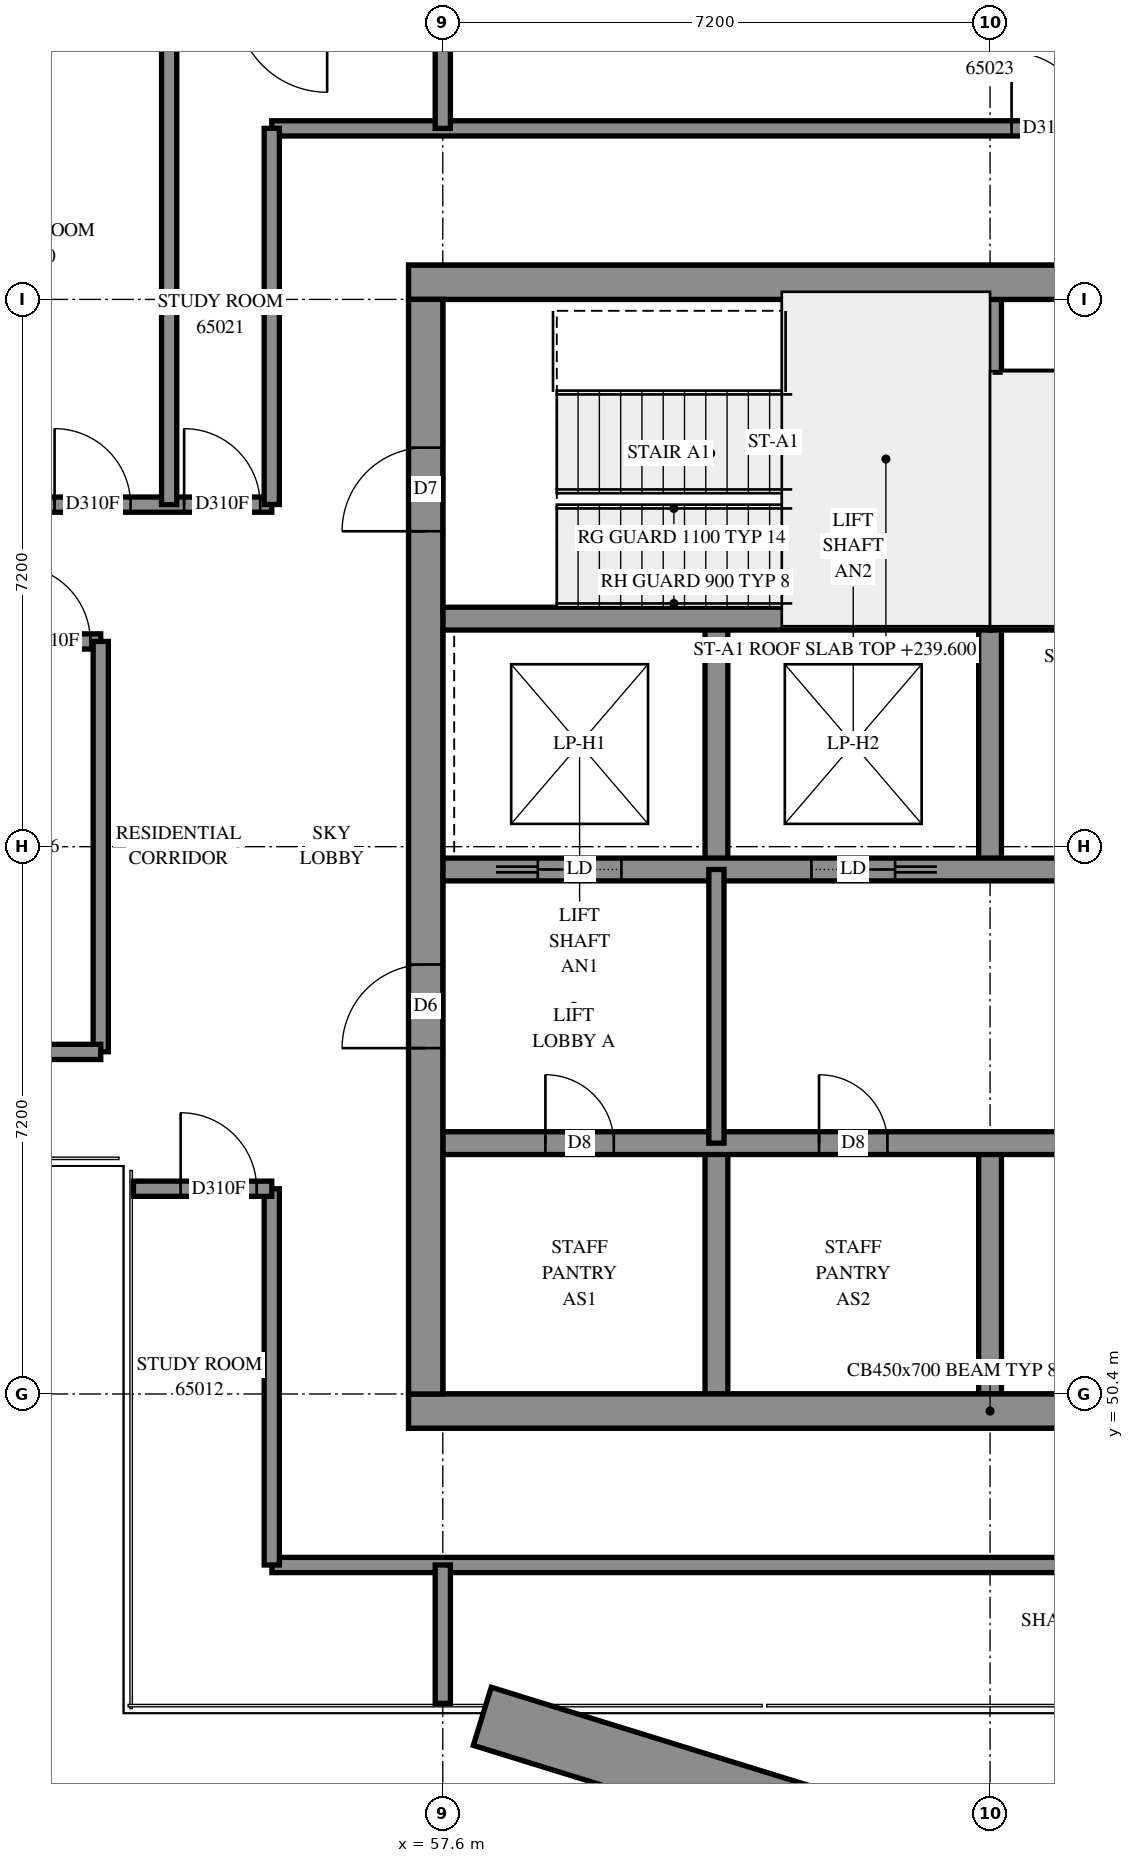
"""IFC4 building model, lengths in metres.
Left out: names, types, materials, properties, quantities, classifications, styles, units other than length and angle.
Written with IfcOpenShell. Run it as: python <this file> out.ifc"""

import sys

from ifc_helpers import new_model, si_unit, direction, frame, frame_2d, origin, place, context, subcontext, project, spatial, rectangle, extrude, element, fill, save


model = new_model("IFC4")
c1 = context("Model", 3, precision=1e-05, world=origin(), true_north=direction((0.0, 1.0)))
c2 = subcontext(c1, "Body", "Model", "MODEL_VIEW")
j1 = project(units=[si_unit("LENGTHUNIT", "METRE"), si_unit("PLANEANGLEUNIT", "RADIAN")], contexts=[c1])
p1 = place(None, origin())
s1 = spatial("IfcSite", under=j1, at=p1, CompositionType="ELEMENT")
p2 = place(p1, origin())
s2 = spatial("IfcBuilding", under=s1, at=p2, CompositionType="ELEMENT")
p3 = place(p2, frame((0.0, 0.0, 239.6)))
s3 = spatial("IfcBuildingStorey", under=s2, at=p3, CompositionType="ELEMENT", Elevation=239.6)
p4 = place(p3, frame((57.15, 50.175, -0.3), z_axis=(0.0, 0.0, 1.0), x_axis=(1.0, 0.0, 0.0)))
e1 = element("IfcWall", 1, at=p4, inside=s3, PredefinedType="SHEAR", context=c2, shape_type="SweptSolid", body=[
    extrude(rectangle(XDim=15.3, YDim=0.45, at=frame_2d((7.65, 0.0))), origin(), (0.0, 0.0, 1.0), 3.5),
])
p5 = place(p3, frame((57.15, 65.025, -0.3), z_axis=(0.0, 0.0, 1.0), x_axis=(1.0, 0.0, 0.0)))
e2 = element("IfcWall", 2, at=p5, inside=s3, PredefinedType="SHEAR", context=c2, shape_type="SweptSolid", body=[
    extrude(rectangle(XDim=15.3, YDim=0.45, at=frame_2d((7.65, 0.0))), origin(), (0.0, 0.0, 1.0), 3.5),
])
p6 = place(p5, frame((10.45, 0.0, 0.3)))
e3 = element("IfcOpeningElement", 3, at=p6, cuts=e2, PredefinedType="OPENING", context=c2, shape_type="SweptSolid", body=[
    extrude(rectangle(XDim=0.8, YDim=2.1, at=frame_2d((0.4, 1.05))), frame((0.0, 0.235, 0.0), z_axis=(0.0, -1.0, 0.0), x_axis=(1.0, 0.0, 0.0)), (0.0, 0.0, 1.0), 0.47),
])
p7 = place(p3, frame((57.375, 50.4, -0.3), z_axis=(0.0, 0.0, 1.0), x_axis=(0.0, 1.0, 0.0)))
e4 = element("IfcWall", 4, at=p7, inside=s3, PredefinedType="SHEAR", context=c2, shape_type="SweptSolid", body=[
    extrude(rectangle(XDim=14.4, YDim=0.45, at=frame_2d((7.2, 0.0))), origin(), (0.0, 0.0, 1.0), 3.5),
])
p8 = place(p7, frame((4.55, 0.0, 0.3)))
e5 = element("IfcOpeningElement", 5, at=p8, cuts=e4, PredefinedType="OPENING", context=c2, shape_type="SweptSolid", body=[
    extrude(rectangle(XDim=1.1, YDim=2.1, at=frame_2d((0.55, 1.05))), frame((0.0, 0.235, 0.0), z_axis=(0.0, -1.0, 0.0), x_axis=(1.0, 0.0, 0.0)), (0.0, 0.0, 1.0), 0.47),
])
p9 = place(p7, frame((11.35, 0.0, 0.3)))
e6 = element("IfcOpeningElement", 6, at=p9, cuts=e4, PredefinedType="OPENING", context=c2, shape_type="SweptSolid", body=[
    extrude(rectangle(XDim=1.1, YDim=2.1, at=frame_2d((0.55, 1.05))), frame((0.0, 0.235, 0.0), z_axis=(0.0, -1.0, 0.0), x_axis=(1.0, 0.0, 0.0)), (0.0, 0.0, 1.0), 0.47),
])
for number, where, z_axis, x_axis in (
    (7, (61.2, 50.4, 0.0), (0.0, 0.0, 1.0), (0.0, 1.0, 0.0)),
    (8, (61.2, 57.3, 0.0), (0.0, 0.0, 1.0), (0.0, 1.0, 0.0)),
    (9, (64.8, 50.4, 0.0), (0.0, 0.0, 1.0), (0.0, 1.0, 0.0)),
    (10, (64.8, 57.3, 0.0), (0.0, 0.0, 1.0), (0.0, 1.0, 0.0)),
):
    element("IfcWall", number, at=place(p3, frame(where, z_axis=z_axis, x_axis=x_axis)), inside=s3, PredefinedType="SOLIDWALL", context=c2, shape_type="SweptSolid", body=[
        extrude(rectangle(XDim=3.3, YDim=0.3, at=frame_2d((1.65, 0.0))), origin(), (0.0, 0.0, 1.0), 3.9),
    ])
p10 = place(p3, frame((57.6, 53.7, 0.0), z_axis=(0.0, 0.0, 1.0), x_axis=(1.0, 0.0, 0.0)))
e11 = element("IfcWall", 11, at=p10, inside=s3, PredefinedType="SOLIDWALL", context=c2, shape_type="SweptSolid", body=[
    extrude(rectangle(XDim=14.4, YDim=0.3, at=frame_2d((7.2, 0.0))), origin(), (0.0, 0.0, 1.0), 3.9),
])
p11 = place(p10, frame((1.35, 0.0, 0.0)))
e12 = element("IfcOpeningElement", 12, at=p11, cuts=e11, PredefinedType="OPENING", context=c2, shape_type="SweptSolid", body=[
    extrude(rectangle(XDim=0.9, YDim=2.1, at=frame_2d((0.45, 1.05))), frame((0.0, 0.16, 0.0), z_axis=(0.0, -1.0, 0.0), x_axis=(1.0, 0.0, 0.0)), (0.0, 0.0, 1.0), 0.32),
])
p12 = place(p10, frame((4.95, 0.0, 0.0)))
e13 = element("IfcOpeningElement", 13, at=p12, cuts=e11, PredefinedType="OPENING", context=c2, shape_type="SweptSolid", body=[
    extrude(rectangle(XDim=0.9, YDim=2.1, at=frame_2d((0.45, 1.05))), frame((0.0, 0.16, 0.0), z_axis=(0.0, -1.0, 0.0), x_axis=(1.0, 0.0, 0.0)), (0.0, 0.0, 1.0), 0.32),
])
p13 = place(p10, frame((8.55, 0.0, 0.0)))
e14 = element("IfcOpeningElement", 14, at=p13, cuts=e11, PredefinedType="OPENING", context=c2, shape_type="SweptSolid", body=[
    extrude(rectangle(XDim=0.9, YDim=2.1, at=frame_2d((0.45, 1.05))), frame((0.0, 0.16, 0.0), z_axis=(0.0, -1.0, 0.0), x_axis=(1.0, 0.0, 0.0)), (0.0, 0.0, 1.0), 0.32),
])
p14 = place(p10, frame((12.05, 0.0, 0.0)))
e15 = element("IfcOpeningElement", 15, at=p14, cuts=e11, PredefinedType="OPENING", context=c2, shape_type="SweptSolid", body=[
    extrude(rectangle(XDim=1.1, YDim=2.1, at=frame_2d((0.55, 1.05))), frame((0.0, 0.16, 0.0), z_axis=(0.0, -1.0, 0.0), x_axis=(1.0, 0.0, 0.0)), (0.0, 0.0, 1.0), 0.32),
])
p15 = place(p3, frame((57.6, 57.3, 0.0), z_axis=(0.0, 0.0, 1.0), x_axis=(1.0, 0.0, 0.0)))
e16 = element("IfcWall", 16, at=p15, inside=s3, PredefinedType="SOLIDWALL", context=c2, shape_type="SweptSolid", body=[
    extrude(rectangle(XDim=14.4, YDim=0.3, at=frame_2d((7.2, 0.0))), origin(), (0.0, 0.0, 1.0), 3.9),
])
p16 = place(p15, frame((1.25, 0.0, 0.0)))
e17 = element("IfcOpeningElement", 17, at=p16, cuts=e16, PredefinedType="OPENING", context=c2, shape_type="SweptSolid", body=[
    extrude(rectangle(XDim=1.1, YDim=2.1, at=frame_2d((0.55, 1.05))), frame((0.0, 0.16, 0.0), z_axis=(0.0, -1.0, 0.0), x_axis=(1.0, 0.0, 0.0)), (0.0, 0.0, 1.0), 0.32),
])
p17 = place(p15, frame((4.85, 0.0, 0.0)))
e18 = element("IfcOpeningElement", 18, at=p17, cuts=e16, PredefinedType="OPENING", context=c2, shape_type="SweptSolid", body=[
    extrude(rectangle(XDim=1.1, YDim=2.1, at=frame_2d((0.55, 1.05))), frame((0.0, 0.16, 0.0), z_axis=(0.0, -1.0, 0.0), x_axis=(1.0, 0.0, 0.0)), (0.0, 0.0, 1.0), 0.32),
])
p18 = place(p15, frame((12.05, 0.0, 0.0)))
e19 = element("IfcOpeningElement", 19, at=p18, cuts=e16, PredefinedType="OPENING", context=c2, shape_type="SweptSolid", body=[
    extrude(rectangle(XDim=1.1, YDim=2.1, at=frame_2d((0.55, 1.05))), frame((0.0, 0.16, 0.0), z_axis=(0.0, -1.0, 0.0), x_axis=(1.0, 0.0, 0.0)), (0.0, 0.0, 1.0), 0.32),
])
for number, where, z_axis, x_axis in (
    (20, (57.6, 60.6, 0.0), (0.0, 0.0, 1.0), (1.0, 0.0, 0.0)),
    (21, (64.8, 60.6, 0.0), (0.0, 0.0, 1.0), (1.0, 0.0, 0.0)),
):
    element("IfcWall", number, at=place(p3, frame(where, z_axis=z_axis, x_axis=x_axis)), inside=s3, PredefinedType="SOLIDWALL", context=c2, shape_type="SweptSolid", body=[
        extrude(rectangle(XDim=7.2, YDim=0.3, at=frame_2d((3.6, 0.0))), origin(), (0.0, 0.0, 1.0), 3.9),
    ])
p19 = place(p3, frame((64.8, 60.6, 0.0), z_axis=(0.0, 0.0, 1.0), x_axis=(0.0, 1.0, 0.0)))
e22 = element("IfcWall", 22, at=p19, inside=s3, PredefinedType="SOLIDWALL", context=c2, shape_type="SweptSolid", body=[
    extrude(rectangle(XDim=4.2, YDim=0.3, at=frame_2d((2.1, 0.0))), origin(), (0.0, 0.0, 1.0), 3.9),
])
p20 = place(p3, frame((62.8, 44.712, 0.0), z_axis=(0.0, 0.0, 1.0), x_axis=(-0.9553591731, 0.2954468656, 0.0)))
e23 = element("IfcWall", 23, at=p20, inside=s3, PredefinedType="SOLIDWALL", context=c2, shape_type="SweptSolid", body=[
    extrude(rectangle(XDim=4.899, YDim=0.8, at=frame_2d((2.449, 0.0))), origin(), (0.0, 0.0, 1.0), 0.65),
])
p21 = place(p3, frame((64.95, 63.78, 0.0), z_axis=(0.0, 0.0, 1.0), x_axis=(1.0, 0.0, 0.0)))
e24 = element("IfcWall", 24, at=p21, inside=s3, PredefinedType="PARTITIONING", context=c2, shape_type="SweptSolid", body=[
    extrude(rectangle(XDim=6.25, YDim=0.15, at=frame_2d((3.125, 0.0))), origin(), (0.0, 0.0, 1.0), 3.9),
])
p22 = place(p3, frame((61.2, 53.7, 0.0), z_axis=(0.0, 0.0, 1.0), x_axis=(0.0, 1.0, 0.0)))
e25 = element("IfcWall", 25, at=p22, inside=s3, PredefinedType="PARTITIONING", context=c2, shape_type="SweptSolid", body=[
    extrude(rectangle(XDim=3.6, YDim=0.2, at=frame_2d((1.8, 0.0))), origin(), (0.0, 0.0, 1.0), 3.9),
])
p23 = place(p3, frame((55.352, 48.15, 0.0), z_axis=(0.0, 0.0, 1.0), x_axis=(1.0, 0.0, 0.0)))
e26 = element("IfcWall", 26, at=p23, inside=s3, PredefinedType="PARTITIONING", context=c2, shape_type="SweptSolid", body=[
    extrude(rectangle(XDim=19.06, YDim=0.2, at=frame_2d((9.53, 0.0))), origin(), (0.0, 0.0, 1.0), 3.9),
])
p24 = place(p23, frame((11.608, 0.0, 0.0)))
e27 = element("IfcOpeningElement", 27, at=p24, cuts=e26, PredefinedType="OPENING", context=c2, shape_type="SweptSolid", body=[
    extrude(rectangle(XDim=1.0, YDim=2.1, at=frame_2d((0.5, 1.05))), frame((0.0, 0.11, 0.0), z_axis=(0.0, -1.0, 0.0), x_axis=(1.0, 0.0, 0.0)), (0.0, 0.0, 1.0), 0.22),
])
p25 = place(p3, frame((55.35, 67.05, 0.0), z_axis=(0.0, 0.0, 1.0), x_axis=(1.0, 0.0, 0.0)))
e28 = element("IfcWall", 28, at=p25, inside=s3, PredefinedType="PARTITIONING", context=c2, shape_type="SweptSolid", body=[
    extrude(rectangle(XDim=18.9, YDim=0.2, at=frame_2d((9.45, 0.0))), origin(), (0.0, 0.0, 1.0), 3.9),
])
p26 = place(p25, frame((9.733, 0.0, 0.0)))
e29 = element("IfcOpeningElement", 29, at=p26, cuts=e28, PredefinedType="OPENING", context=c2, shape_type="SweptSolid", body=[
    extrude(rectangle(XDim=1.0, YDim=2.1, at=frame_2d((0.5, 1.05))), frame((0.0, 0.11, 0.0), z_axis=(0.0, -1.0, 0.0), x_axis=(1.0, 0.0, 0.0)), (0.0, 0.0, 1.0), 0.22),
])
p27 = place(p3, frame((40.502, 62.1, 0.0), z_axis=(0.0, 0.0, 1.0), x_axis=(1.0, 0.0, 0.0)))
e30 = element("IfcWall", 30, at=p27, inside=s3, PredefinedType="PARTITIONING", context=c2, shape_type="SweptSolid", body=[
    extrude(rectangle(XDim=14.848, YDim=0.2, at=frame_2d((7.424, 0.0))), origin(), (0.0, 0.0, 1.0), 3.9),
])
p28 = place(p27, frame((6.561, 0.0, 0.0)))
e31 = element("IfcOpeningElement", 31, at=p28, cuts=e30, PredefinedType="OPENING", context=c2, shape_type="SweptSolid", body=[
    extrude(rectangle(XDim=1.0, YDim=2.1, at=frame_2d((0.5, 1.05))), frame((0.0, 0.11, 0.0), z_axis=(0.0, -1.0, 0.0), x_axis=(1.0, 0.0, 0.0)), (0.0, 0.0, 1.0), 0.22),
])
p29 = place(p27, frame((11.991, 0.0, 0.0)))
e32 = element("IfcOpeningElement", 32, at=p29, cuts=e30, PredefinedType="OPENING", context=c2, shape_type="SweptSolid", body=[
    extrude(rectangle(XDim=1.0, YDim=2.1, at=frame_2d((0.5, 1.05))), frame((0.0, 0.11, 0.0), z_axis=(0.0, -1.0, 0.0), x_axis=(1.0, 0.0, 0.0)), (0.0, 0.0, 1.0), 0.22),
])
p30 = place(p27, frame((13.695, 0.0, 0.0)))
e33 = element("IfcOpeningElement", 33, at=p30, cuts=e30, PredefinedType="OPENING", context=c2, shape_type="SweptSolid", body=[
    extrude(rectangle(XDim=1.0, YDim=2.1, at=frame_2d((0.5, 1.05))), frame((0.0, 0.11, 0.0), z_axis=(0.0, -1.0, 0.0), x_axis=(1.0, 0.0, 0.0)), (0.0, 0.0, 1.0), 0.22),
])
p31 = place(p3, frame((46.33, 60.3, 0.0), z_axis=(0.0, 0.0, 1.0), x_axis=(1.0, 0.0, 0.0)))
e34 = element("IfcWall", 34, at=p31, inside=s3, PredefinedType="PARTITIONING", context=c2, shape_type="SweptSolid", body=[
    extrude(rectangle(XDim=6.77, YDim=0.2, at=frame_2d((3.385, 0.0))), origin(), (0.0, 0.0, 1.0), 3.9),
])
p32 = place(p31, frame((0.924, 0.0, 0.0)))
e35 = element("IfcOpeningElement", 35, at=p32, cuts=e34, PredefinedType="OPENING", context=c2, shape_type="SweptSolid", body=[
    extrude(rectangle(XDim=1.0, YDim=2.1, at=frame_2d((0.5, 1.05))), frame((0.0, 0.11, 0.0), z_axis=(0.0, -1.0, 0.0), x_axis=(1.0, 0.0, 0.0)), (0.0, 0.0, 1.0), 0.22),
])
p33 = place(p31, frame((5.633, 0.0, 0.0)))
e36 = element("IfcOpeningElement", 36, at=p33, cuts=e34, PredefinedType="OPENING", context=c2, shape_type="SweptSolid", body=[
    extrude(rectangle(XDim=1.0, YDim=2.1, at=frame_2d((0.5, 1.05))), frame((0.0, 0.11, 0.0), z_axis=(0.0, -1.0, 0.0), x_axis=(1.0, 0.0, 0.0)), (0.0, 0.0, 1.0), 0.22),
])
p34 = place(p3, frame((54.0, 62.1, 0.0), z_axis=(0.0, 0.0, 1.0), x_axis=(0.0, 1.0, 0.0)))
e37 = element("IfcWall", 37, at=p34, inside=s3, PredefinedType="PARTITIONING", context=c2, shape_type="SweptSolid", body=[
    extrude(rectangle(XDim=6.35, YDim=0.2, at=frame_2d((3.175, 0.0))), origin(), (0.0, 0.0, 1.0), 3.9),
])
p35 = place(p3, frame((53.1, 54.902, 0.0), z_axis=(0.0, 0.0, 1.0), x_axis=(0.0, 1.0, 0.0)))
e38 = element("IfcWall", 38, at=p35, inside=s3, PredefinedType="PARTITIONING", context=c2, shape_type="SweptSolid", body=[
    extrude(rectangle(XDim=5.398, YDim=0.2, at=frame_2d((2.699, 0.0))), origin(), (0.0, 0.0, 1.0), 3.9),
])
p36 = place(p3, frame((55.35, 48.15, 0.0), z_axis=(0.0, 0.0, 1.0), x_axis=(0.0, 1.0, 0.0)))
e39 = element("IfcWall", 39, at=p36, inside=s3, PredefinedType="PARTITIONING", context=c2, shape_type="SweptSolid", body=[
    extrude(rectangle(XDim=4.95, YDim=0.2, at=frame_2d((2.475, 0.0))), origin(), (0.0, 0.0, 1.0), 3.9),
])
p37 = place(p3, frame((55.35, 62.102, 0.0), z_axis=(0.0, 0.0, 1.0), x_axis=(0.0, 1.0, 0.0)))
e40 = element("IfcWall", 40, at=p37, inside=s3, PredefinedType="PARTITIONING", context=c2, shape_type="SweptSolid", body=[
    extrude(rectangle(XDim=4.948, YDim=0.2, at=frame_2d((2.474, 0.0))), origin(), (0.0, 0.0, 1.0), 3.9),
])
p38 = place(p3, frame((50.4, 54.9, 0.0), z_axis=(0.0, 0.0, 1.0), x_axis=(1.0, 0.0, 0.0)))
e41 = element("IfcWall", 41, at=p38, inside=s3, PredefinedType="PARTITIONING", context=c2, shape_type="SweptSolid", body=[
    extrude(rectangle(XDim=2.7, YDim=0.2, at=frame_2d((1.35, 0.0))), origin(), (0.0, 0.0, 1.0), 3.9),
])
p39 = place(p3, frame((57.6, 67.05, 0.0), z_axis=(0.0, 0.0, 1.0), x_axis=(0.0, 1.0, 0.0)))
e42 = element("IfcWall", 42, at=p39, inside=s3, PredefinedType="PARTITIONING", context=c2, shape_type="SweptSolid", body=[
    extrude(rectangle(XDim=1.82, YDim=0.2, at=frame_2d((0.91, 0.0))), origin(), (0.0, 0.0, 1.0), 3.9),
])
p40 = place(p3, frame((53.53, 53.1, 0.0), z_axis=(0.0, 0.0, 1.0), x_axis=(1.0, 0.0, 0.0)))
e43 = element("IfcWall", 43, at=p40, inside=s3, PredefinedType="PARTITIONING", context=c2, shape_type="SweptSolid", body=[
    extrude(rectangle(XDim=1.82, YDim=0.2, at=frame_2d((0.91, 0.0))), origin(), (0.0, 0.0, 1.0), 3.9),
])
p41 = place(p40, frame((0.621, 0.0, 0.0)))
e44 = element("IfcOpeningElement", 44, at=p41, cuts=e43, PredefinedType="OPENING", context=c2, shape_type="SweptSolid", body=[
    extrude(rectangle(XDim=1.0, YDim=2.1, at=frame_2d((0.5, 1.05))), frame((0.0, 0.11, 0.0), z_axis=(0.0, -1.0, 0.0), x_axis=(1.0, 0.0, 0.0)), (0.0, 0.0, 1.0), 0.22),
])
p42 = place(p3, frame((57.6, 46.33, 0.0), z_axis=(0.0, 0.0, 1.0), x_axis=(0.0, 1.0, 0.0)))
e45 = element("IfcWall", 45, at=p42, inside=s3, PredefinedType="PARTITIONING", context=c2, shape_type="SweptSolid", body=[
    extrude(rectangle(XDim=1.82, YDim=0.2, at=frame_2d((0.91, 0.0))), origin(), (0.0, 0.0, 1.0), 3.9),
])
p43 = place(p8, origin())
e46 = element("IfcDoor", 46, at=p43, inside=s3, OperationType="DOUBLE_DOOR_SINGLE_SWING", PredefinedType="DOOR", context=c2, shape_type="SweptSolid", body=[
    extrude(rectangle(XDim=1.1, YDim=2.1, at=frame_2d((0.55, 1.05))), frame((0.0, 0.025, 0.0), z_axis=(0.0, -1.0, 0.0), x_axis=(1.0, 0.0, 0.0)), (0.0, 0.0, 1.0), 0.05),
])
fill(e5, e46)
p44 = place(p9, origin())
e47 = element("IfcDoor", 47, at=p44, inside=s3, OperationType="SINGLE_SWING_LEFT", PredefinedType="DOOR", context=c2, shape_type="SweptSolid", body=[
    extrude(rectangle(XDim=1.1, YDim=2.1, at=frame_2d((0.55, 1.05))), frame((0.0, 0.025, 0.0), z_axis=(0.0, -1.0, 0.0), x_axis=(1.0, 0.0, 0.0)), (0.0, 0.0, 1.0), 0.05),
])
fill(e6, e47)
p45 = place(p11, origin())
e48 = element("IfcDoor", 48, at=p45, inside=s3, OperationType="SINGLE_SWING_LEFT", PredefinedType="DOOR", context=c2, shape_type="SweptSolid", body=[
    extrude(rectangle(XDim=0.9, YDim=2.1, at=frame_2d((0.45, 1.05))), frame((0.0, 0.025, 0.0), z_axis=(0.0, -1.0, 0.0), x_axis=(1.0, 0.0, 0.0)), (0.0, 0.0, 1.0), 0.05),
])
fill(e12, e48)
p46 = place(p12, origin())
e49 = element("IfcDoor", 49, at=p46, inside=s3, OperationType="SINGLE_SWING_LEFT", PredefinedType="DOOR", context=c2, shape_type="SweptSolid", body=[
    extrude(rectangle(XDim=0.9, YDim=2.1, at=frame_2d((0.45, 1.05))), frame((0.0, 0.025, 0.0), z_axis=(0.0, -1.0, 0.0), x_axis=(1.0, 0.0, 0.0)), (0.0, 0.0, 1.0), 0.05),
])
fill(e13, e49)
p47 = place(p16, origin())
e50 = element("IfcDoor", 50, at=p47, inside=s3, OperationType="SLIDING_TO_LEFT", PredefinedType="DOOR", context=c2, shape_type="SweptSolid", body=[
    extrude(rectangle(XDim=1.1, YDim=2.1, at=frame_2d((0.55, 1.05))), frame((0.0, 0.025, 0.0), z_axis=(0.0, -1.0, 0.0), x_axis=(1.0, 0.0, 0.0)), (0.0, 0.0, 1.0), 0.05),
])
fill(e17, e50)
p48 = place(p17, origin())
e51 = element("IfcDoor", 51, at=p48, inside=s3, OperationType="SLIDING_TO_RIGHT", PredefinedType="DOOR", context=c2, shape_type="SweptSolid", body=[
    extrude(rectangle(XDim=1.1, YDim=2.1, at=frame_2d((0.55, 1.05))), frame((0.0, 0.025, 0.0), z_axis=(0.0, -1.0, 0.0), x_axis=(1.0, 0.0, 0.0)), (0.0, 0.0, 1.0), 0.05),
])
fill(e18, e51)
p49 = place(p41, origin())
e52 = element("IfcDoor", 52, at=p49, inside=s3, OperationType="SINGLE_SWING_RIGHT", PredefinedType="DOOR", context=c2, shape_type="SweptSolid", body=[
    extrude(rectangle(XDim=1.0, YDim=2.1, at=frame_2d((0.5, 1.05))), frame((0.0, 0.025, 0.0), z_axis=(0.0, -1.0, 0.0), x_axis=(1.0, 0.0, 0.0)), (0.0, 0.0, 1.0), 0.05),
])
fill(e44, e52)
p50 = place(p33, origin())
e53 = element("IfcDoor", 53, at=p50, inside=s3, OperationType="SINGLE_SWING_LEFT", PredefinedType="DOOR", context=c2, shape_type="SweptSolid", body=[
    extrude(rectangle(XDim=1.0, YDim=2.1, at=frame_2d((0.5, 1.05))), frame((0.0, 0.025, 0.0), z_axis=(0.0, -1.0, 0.0), x_axis=(1.0, 0.0, 0.0)), (0.0, 0.0, 1.0), 0.05),
])
fill(e36, e53)
p51 = place(p29, origin())
e54 = element("IfcDoor", 54, at=p51, inside=s3, OperationType="SINGLE_SWING_RIGHT", PredefinedType="DOOR", context=c2, shape_type="SweptSolid", body=[
    extrude(rectangle(XDim=1.0, YDim=2.1, at=frame_2d((0.5, 1.05))), frame((0.0, 0.025, 0.0), z_axis=(0.0, -1.0, 0.0), x_axis=(1.0, 0.0, 0.0)), (0.0, 0.0, 1.0), 0.05),
])
fill(e32, e54)
p52 = place(p30, origin())
e55 = element("IfcDoor", 55, at=p52, inside=s3, OperationType="SINGLE_SWING_LEFT", PredefinedType="DOOR", context=c2, shape_type="SweptSolid", body=[
    extrude(rectangle(XDim=1.0, YDim=2.1, at=frame_2d((0.5, 1.05))), frame((0.0, 0.025, 0.0), z_axis=(0.0, -1.0, 0.0), x_axis=(1.0, 0.0, 0.0)), (0.0, 0.0, 1.0), 0.05),
])
fill(e33, e55)
p53 = place(p26, origin())
e56 = element("IfcDoor", 56, at=p53, inside=s3, OperationType="SINGLE_SWING_RIGHT", PredefinedType="DOOR", context=c2, shape_type="SweptSolid", body=[
    extrude(rectangle(XDim=1.0, YDim=2.1, at=frame_2d((0.5, 1.05))), frame((0.0, 0.025, 0.0), z_axis=(0.0, -1.0, 0.0), x_axis=(1.0, 0.0, 0.0)), (0.0, 0.0, 1.0), 0.05),
])
fill(e29, e56)
save(model, sys.argv[1])
